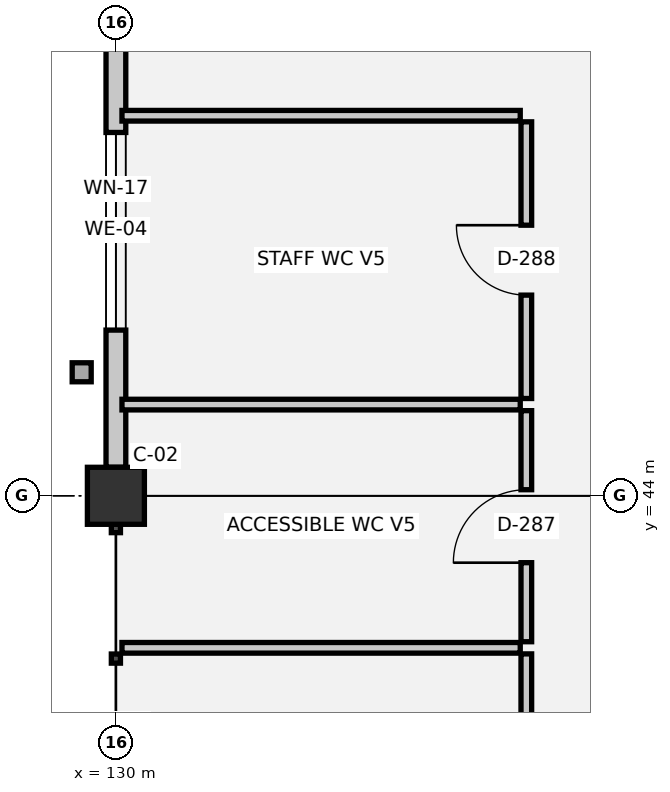
"""IFC4 building model, lengths in metres.
Left out: names, types, materials, properties, quantities, classifications, styles, units other than length and angle.
Written with IfcOpenShell. Run it as: python <this file> out.ifc"""

import sys

from ifc_helpers import new_model, si_unit, direction, frame, frame_2d, origin, origin_2d, place, context, subcontext, project, spatial, rectangle, extrude, element, fill, save


model = new_model("IFC4")
c1 = context("Model", 3, precision=1e-05, world=origin(), true_north=direction((0.0, 1.0)))
c2 = subcontext(c1, "Body", "Model", "MODEL_VIEW")
j1 = project(units=[si_unit("LENGTHUNIT", "METRE"), si_unit("PLANEANGLEUNIT", "RADIAN")], contexts=[c1])
p1 = place(None, origin())
s1 = spatial("IfcSite", under=j1, at=p1, CompositionType="ELEMENT")
p2 = place(p1, origin())
s2 = spatial("IfcBuilding", under=s1, at=p2, CompositionType="ELEMENT")
p3 = place(p2, frame((0.0, 0.0, 5.4)))
s3 = spatial("IfcBuildingStorey", under=s2, at=p3, CompositionType="ELEMENT", Elevation=5.4)
p4 = place(p3, frame((130.0, 44.0, 0.0), z_axis=(0.0, 0.0, 1.0), x_axis=(1.0, 0.0, 0.0)))
e1 = element("IfcColumn", 1, at=p4, inside=s3, PredefinedType="COLUMN", context=c2, shape_type="SweptSolid", body=[
    extrude(rectangle(XDim=0.75, YDim=0.75, at=origin_2d()), origin(), (0.0, 0.0, 1.0), 4.5),
])
p5 = place(p3, frame((130.0, 44.375, 0.0), z_axis=(0.0, 0.0, 1.0), x_axis=(0.0, 1.0, 0.0)))
e2 = element("IfcWall", 2, at=p5, inside=s3, PredefinedType="SOLIDWALL", context=c2, shape_type="SweptSolid", body=[
    extrude(rectangle(XDim=6.25, YDim=0.26, at=frame_2d((3.125, 0.0))), origin(), (0.0, 0.0, 1.0), 3.23),
])
p6 = place(p5, frame((1.805, 0.0, 1.0)))
e3 = element("IfcOpeningElement", 3, at=p6, cuts=e2, PredefinedType="OPENING", context=c2, shape_type="SweptSolid", body=[
    extrude(rectangle(XDim=2.6, YDim=1.1, at=frame_2d((1.3, 0.55))), frame((0.0, 0.14, 0.0), z_axis=(0.0, -1.0, 0.0), x_axis=(1.0, 0.0, 0.0)), (0.0, 0.0, 1.0), 0.28),
])
for number, where, z_axis, x_axis in (
    (4, (130.08, 42.0, 0.0), (0.0, 0.0, 1.0), (1.0, 0.0, 0.0)),
    (5, (130.08, 45.2, 0.0), (0.0, 0.0, 1.0), (1.0, 0.0, 0.0)),
    (6, (130.08, 49.0, 0.0), (0.0, 0.0, 1.0), (1.0, 0.0, 0.0)),
):
    element("IfcWall", number, at=place(p3, frame(where, z_axis=z_axis, x_axis=x_axis)), inside=s3, PredefinedType="PLUMBINGWALL", context=c2, shape_type="SweptSolid", body=[
        extrude(rectangle(XDim=5.24, YDim=0.14, at=frame_2d((2.62, 0.0))), origin(), (0.0, 0.0, 1.0), 4.14),
    ])
p7 = place(p3, frame((135.4, 38.08, 0.0), z_axis=(0.0, 0.0, 1.0), x_axis=(0.0, 1.0, 0.0)))
e7 = element("IfcWall", 7, at=p7, inside=s3, PredefinedType="PLUMBINGWALL", context=c2, shape_type="SweptSolid", body=[
    extrude(rectangle(XDim=3.84, YDim=0.14, at=frame_2d((1.92, 0.0))), origin(), (0.0, 0.0, 1.0), 4.14),
])
p8 = place(p7, frame((1.46, 0.0, 0.0)))
e8 = element("IfcOpeningElement", 8, at=p8, cuts=e7, PredefinedType="OPENING", context=c2, shape_type="SweptSolid", body=[
    extrude(rectangle(XDim=0.92, YDim=2.1, at=frame_2d((0.46, 1.05))), frame((0.0, 0.08, 0.0), z_axis=(0.0, -1.0, 0.0), x_axis=(1.0, 0.0, 0.0)), (0.0, 0.0, 1.0), 0.16),
])
p9 = place(p3, frame((135.4, 42.08, 0.0), z_axis=(0.0, 0.0, 1.0), x_axis=(0.0, 1.0, 0.0)))
e9 = element("IfcWall", 9, at=p9, inside=s3, PredefinedType="PLUMBINGWALL", context=c2, shape_type="SweptSolid", body=[
    extrude(rectangle(XDim=3.04, YDim=0.14, at=frame_2d((1.52, 0.0))), origin(), (0.0, 0.0, 1.0), 4.14),
])
p10 = place(p9, frame((1.04, 0.0, 0.0)))
e10 = element("IfcOpeningElement", 10, at=p10, cuts=e9, PredefinedType="OPENING", context=c2, shape_type="SweptSolid", body=[
    extrude(rectangle(XDim=0.96, YDim=2.1, at=frame_2d((0.48, 1.05))), frame((0.0, 0.08, 0.0), z_axis=(0.0, -1.0, 0.0), x_axis=(1.0, 0.0, 0.0)), (0.0, 0.0, 1.0), 0.16),
])
p11 = place(p3, frame((135.4, 45.28, 0.0), z_axis=(0.0, 0.0, 1.0), x_axis=(0.0, 1.0, 0.0)))
e11 = element("IfcWall", 11, at=p11, inside=s3, PredefinedType="PLUMBINGWALL", context=c2, shape_type="SweptSolid", body=[
    extrude(rectangle(XDim=3.64, YDim=0.14, at=frame_2d((1.82, 0.0))), origin(), (0.0, 0.0, 1.0), 4.14),
])
p12 = place(p11, frame((1.36, 0.0, 0.0)))
e12 = element("IfcOpeningElement", 12, at=p12, cuts=e11, PredefinedType="OPENING", context=c2, shape_type="SweptSolid", body=[
    extrude(rectangle(XDim=0.92, YDim=2.1, at=frame_2d((0.46, 1.05))), frame((0.0, 0.08, 0.0), z_axis=(0.0, -1.0, 0.0), x_axis=(1.0, 0.0, 0.0)), (0.0, 0.0, 1.0), 0.16),
])
p13 = place(p6, origin())
e13 = element("IfcWindow", 13, at=p13, inside=s3, PartitioningType="SINGLE_PANEL", PredefinedType="WINDOW", context=c2, shape_type="SweptSolid", body=[
    extrude(rectangle(XDim=2.6, YDim=1.1, at=frame_2d((1.3, 0.55))), frame((0.0, 0.03, 0.0), z_axis=(0.0, -1.0, 0.0), x_axis=(1.0, 0.0, 0.0)), (0.0, 0.0, 1.0), 0.06),
])
fill(e3, e13)
p14 = place(p10, origin())
e14 = element("IfcDoor", 14, at=p14, inside=s3, OperationType="SINGLE_SWING_LEFT", PredefinedType="DOOR", context=c2, shape_type="SweptSolid", body=[
    extrude(rectangle(XDim=0.96, YDim=2.1, at=frame_2d((0.48, 1.05))), frame((0.0, 0.025, 0.0), z_axis=(0.0, -1.0, 0.0), x_axis=(1.0, 0.0, 0.0)), (0.0, 0.0, 1.0), 0.05),
])
fill(e10, e14)
p15 = place(p12, origin())
e15 = element("IfcDoor", 15, at=p15, inside=s3, OperationType="SINGLE_SWING_RIGHT", PredefinedType="DOOR", context=c2, shape_type="SweptSolid", body=[
    extrude(rectangle(XDim=0.92, YDim=2.1, at=frame_2d((0.46, 1.05))), frame((0.0, 0.025, 0.0), z_axis=(0.0, -1.0, 0.0), x_axis=(1.0, 0.0, 0.0)), (0.0, 0.0, 1.0), 0.05),
])
fill(e12, e15)
save(model, sys.argv[1])
